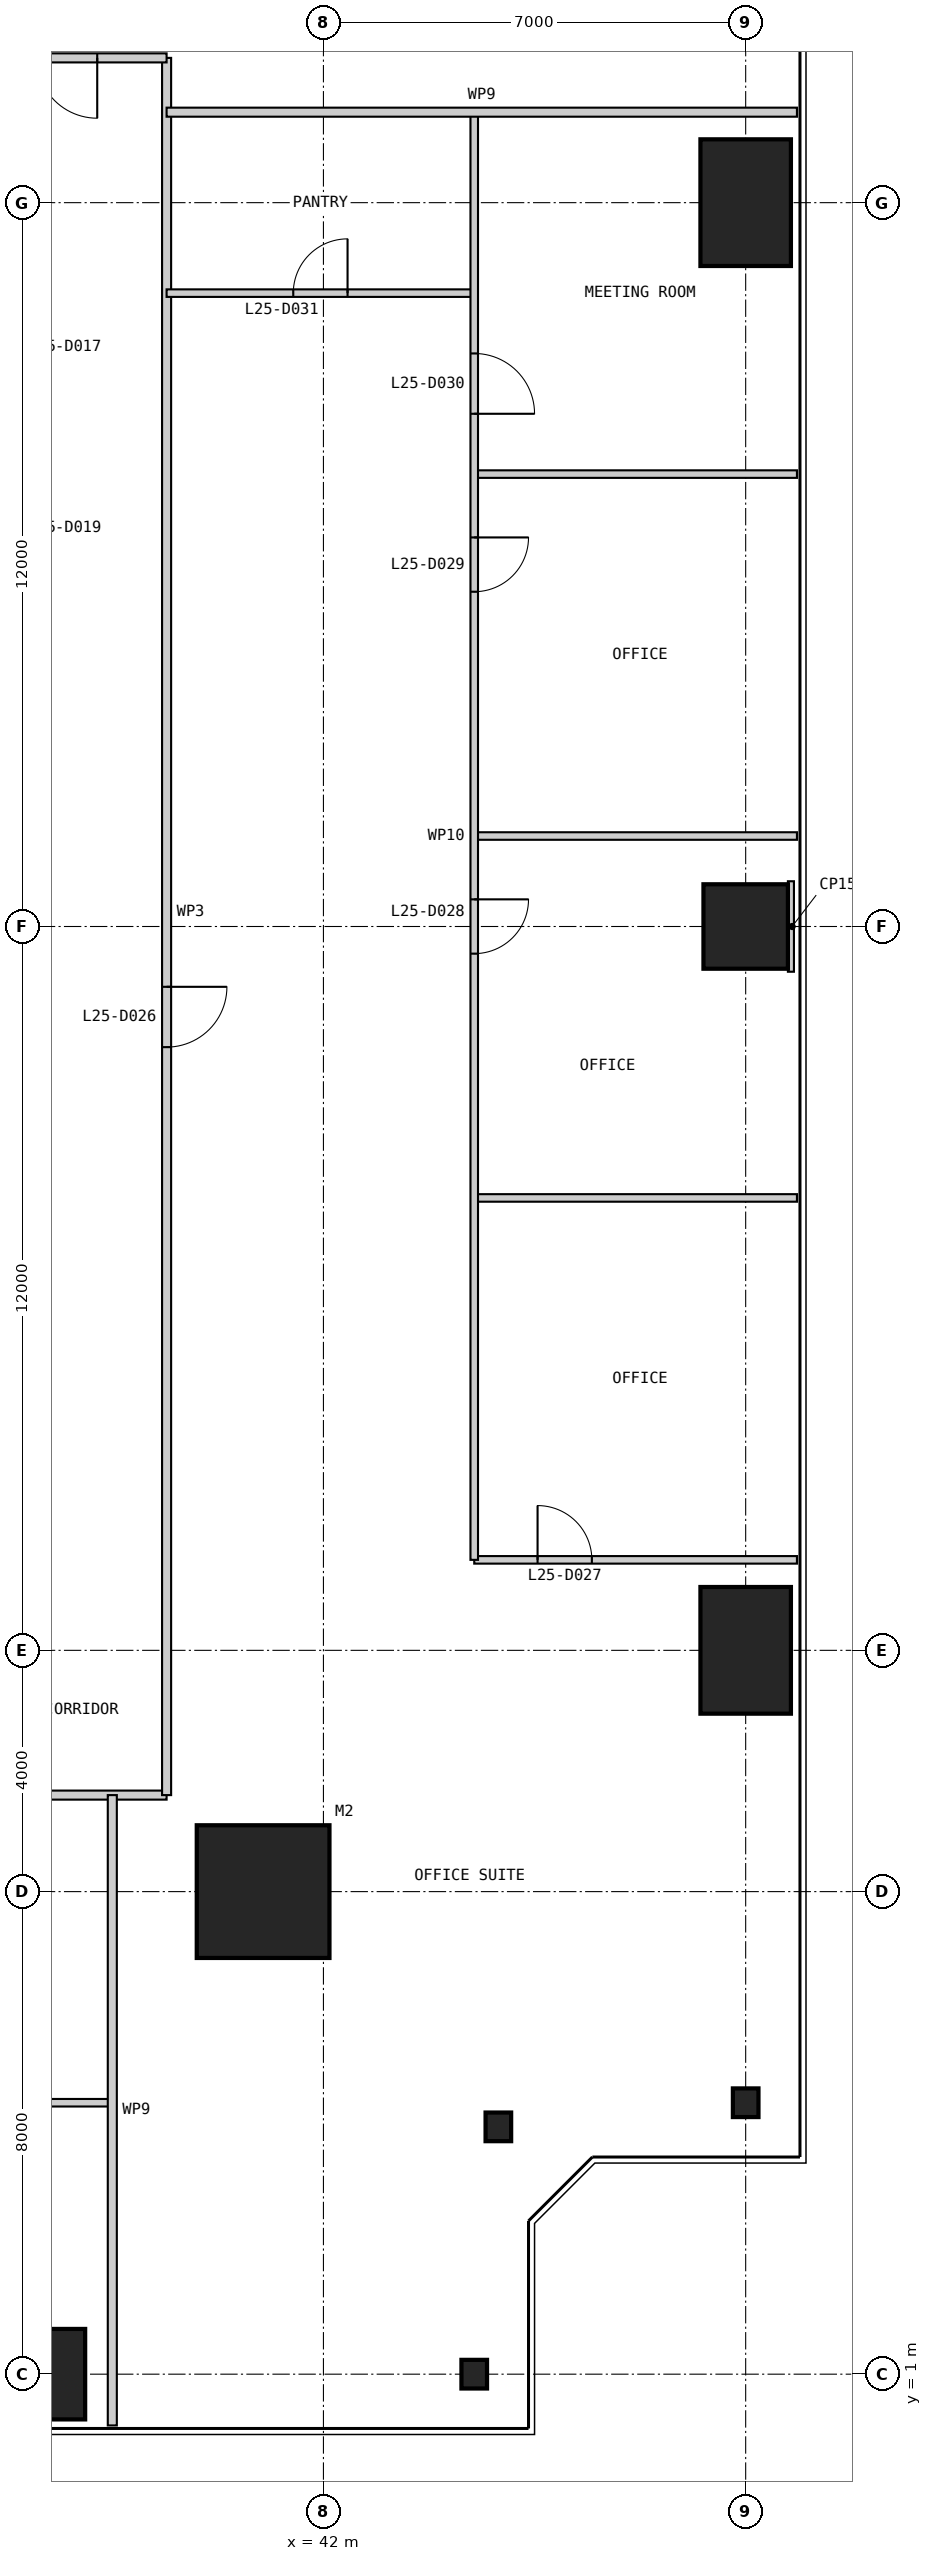
"""IFC4 building model, lengths in metres.
Left out: names, types, materials, properties, quantities, classifications, styles, units other than length and angle.
Written with IfcOpenShell. Run it as: python <this file> out.ifc"""

import sys

from ifc_helpers import new_model, si_unit, direction, frame, frame_2d, origin, origin_2d, place, context, subcontext, project, spatial, rectangle, i_section, extrude, element, fill, save


model = new_model("IFC4")
c1 = context("Model", 3, precision=1e-05, world=origin(), true_north=direction((0.0, 1.0)))
c2 = subcontext(c1, "Body", "Model", "MODEL_VIEW")
j1 = project(units=[si_unit("LENGTHUNIT", "METRE"), si_unit("PLANEANGLEUNIT", "RADIAN")], contexts=[c1])
p1 = place(None, origin())
s1 = spatial("IfcSite", under=j1, at=p1, CompositionType="ELEMENT")
p2 = place(p1, origin())
s2 = spatial("IfcBuilding", under=s1, at=p2, CompositionType="ELEMENT")
p3 = place(p2, frame((0.0, 0.0, 110.4)))
s3 = spatial("IfcBuildingStorey", under=s2, at=p3, CompositionType="ELEMENT", Elevation=110.4)
p4 = place(p3, frame((41.0, 9.0, 0.0), z_axis=(0.0, 0.0, 1.0), x_axis=(1.0, 0.0, 0.0)))
e1 = element("IfcColumn", 1, at=p4, inside=s3, PredefinedType="COLUMN", context=c2, shape_type="SweptSolid", body=[
    extrude(rectangle(XDim=2.2, YDim=2.2, at=origin_2d()), origin(), (0.0, 0.0, 1.0), 4.0),
])
p5 = place(p3, frame((37.0, 1.0, 0.0), z_axis=(0.0, 0.0, 1.0), x_axis=(1.0, 0.0, 0.0)))
e2 = element("IfcColumn", 2, at=p5, inside=s3, PredefinedType="COLUMN", context=c2, shape_type="SweptSolid", body=[
    extrude(rectangle(XDim=2.1, YDim=1.5, at=origin_2d()), origin(), (0.0, 0.0, 1.0), 4.0),
])
for number, where, z_axis, x_axis in (
    (3, (44.5, 1.0, 0.0), (0.0, 0.0, 1.0), (1.0, 0.0, 0.0)),
    (4, (44.9, 5.1, 0.0), (0.0, 0.0, 1.0), (1.0, 0.0, 0.0)),
    (5, (49.0, 5.5, 0.0), (0.0, 0.0, 1.0), (1.0, 0.0, 0.0)),
):
    element("IfcColumn", number, at=place(p3, frame(where, z_axis=z_axis, x_axis=x_axis)), inside=s3, PredefinedType="COLUMN", context=c2, shape_type="SweptSolid", body=[
        extrude(i_section(OverallWidth=0.424, OverallDepth=0.475, WebThickness=0.048, FlangeThickness=0.077, at=origin_2d()), origin(), (0.0, 0.0, 1.0), 4.0),
    ])
p6 = place(p3, frame((49.0, 13.0, 0.0), z_axis=(0.0, 0.0, 1.0), x_axis=(1.0, 0.0, 0.0)))
e6 = element("IfcColumn", 6, at=p6, inside=s3, PredefinedType="COLUMN", context=c2, shape_type="SweptSolid", body=[
    extrude(rectangle(XDim=1.5, YDim=2.1, at=origin_2d()), origin(), (0.0, 0.0, 1.0), 4.0),
])
p7 = place(p3, frame((49.0, 25.0, 0.0), z_axis=(0.0, 0.0, 1.0), x_axis=(1.0, 0.0, 0.0)))
e7 = element("IfcColumn", 7, at=p7, inside=s3, PredefinedType="COLUMN", context=c2, shape_type="SweptSolid", body=[
    extrude(rectangle(XDim=1.4, YDim=1.4, at=origin_2d()), origin(), (0.0, 0.0, 1.0), 4.0),
])
p8 = place(p3, frame((49.0, 37.0, 0.0), z_axis=(0.0, 0.0, 1.0), x_axis=(1.0, 0.0, 0.0)))
e8 = element("IfcColumn", 8, at=p8, inside=s3, PredefinedType="COLUMN", context=c2, shape_type="SweptSolid", body=[
    extrude(rectangle(XDim=1.5, YDim=2.1, at=origin_2d()), origin(), (0.0, 0.0, 1.0), 4.0),
])
p9 = place(p3, frame((11.5, 10.6, 0.0), z_axis=(0.0, 0.0, 1.0), x_axis=(1.0, 0.0, 0.0)))
e9 = element("IfcWall", 9, at=p9, inside=s3, PredefinedType="PARTITIONING", context=c2, shape_type="SweptSolid", body=[
    extrude(rectangle(XDim=27.9, YDim=0.15, at=frame_2d((13.95, 0.0))), origin(), (0.0, 0.0, 1.0), 3.85),
])
p10 = place(p9, frame((12.25, 0.0, 0.0)))
e10 = element("IfcOpeningElement", 10, at=p10, cuts=e9, PredefinedType="OPENING", context=c2, shape_type="SweptSolid", body=[
    extrude(rectangle(XDim=1.0, YDim=2.2, at=frame_2d((0.5, 1.1))), frame((0.0, 0.085, 0.0), z_axis=(0.0, -1.0, 0.0), x_axis=(1.0, 0.0, 0.0)), (0.0, 0.0, 1.0), 0.17),
])
p11 = place(p3, frame((14.5, 5.5, 0.0), z_axis=(0.0, 0.0, 1.0), x_axis=(1.0, 0.0, 0.0)))
e11 = element("IfcWall", 11, at=p11, inside=s3, PredefinedType="PARTITIONING", context=c2, shape_type="SweptSolid", body=[
    extrude(rectangle(XDim=24.0, YDim=0.125, at=frame_2d((12.0, 0.0))), origin(), (0.0, 0.0, 1.0), 3.85),
])
p12 = place(p11, frame((10.05, 0.0, 0.0)))
e12 = element("IfcOpeningElement", 12, at=p12, cuts=e11, PredefinedType="OPENING", context=c2, shape_type="SweptSolid", body=[
    extrude(rectangle(XDim=0.9, YDim=2.2, at=frame_2d((0.45, 1.1))), frame((0.0, 0.073, 0.0), z_axis=(0.0, -1.0, 0.0), x_axis=(1.0, 0.0, 0.0)), (0.0, 0.0, 1.0), 0.145),
])
p13 = place(p11, frame((16.05, 0.0, 0.0)))
e13 = element("IfcOpeningElement", 13, at=p13, cuts=e11, PredefinedType="OPENING", context=c2, shape_type="SweptSolid", body=[
    extrude(rectangle(XDim=0.9, YDim=2.2, at=frame_2d((0.45, 1.1))), frame((0.0, 0.073, 0.0), z_axis=(0.0, -1.0, 0.0), x_axis=(1.0, 0.0, 0.0)), (0.0, 0.0, 1.0), 0.145),
])
p14 = place(p11, frame((19.0, 0.0, 0.0)))
e14 = element("IfcOpeningElement", 14, at=p14, cuts=e11, PredefinedType="OPENING", context=c2, shape_type="SweptSolid", body=[
    extrude(rectangle(XDim=1.0, YDim=2.2, at=frame_2d((0.5, 1.1))), frame((0.0, 0.073, 0.0), z_axis=(0.0, -1.0, 0.0), x_axis=(1.0, 0.0, 0.0)), (0.0, 0.0, 1.0), 0.145),
])
p15 = place(p3, frame((39.4, 10.6, 0.0), z_axis=(0.0, 0.0, 1.0), x_axis=(0.0, 1.0, 0.0)))
e15 = element("IfcWall", 15, at=p15, inside=s3, PredefinedType="PARTITIONING", context=c2, shape_type="SweptSolid", body=[
    extrude(rectangle(XDim=28.8, YDim=0.15, at=frame_2d((14.4, 0.0))), origin(), (0.0, 0.0, 1.0), 3.85),
])
p16 = place(p15, frame((12.4, 0.0, 0.0)))
e16 = element("IfcOpeningElement", 16, at=p16, cuts=e15, PredefinedType="OPENING", context=c2, shape_type="SweptSolid", body=[
    extrude(rectangle(XDim=1.0, YDim=2.2, at=frame_2d((0.5, 1.1))), frame((0.0, 0.085, 0.0), z_axis=(0.0, -1.0, 0.0), x_axis=(1.0, 0.0, 0.0)), (0.0, 0.0, 1.0), 0.17),
])
p17 = place(p3, frame((38.5, 0.15, 0.0), z_axis=(0.0, 0.0, 1.0), x_axis=(0.0, 1.0, 0.0)))
e17 = element("IfcWall", 17, at=p17, inside=s3, PredefinedType="PARTITIONING", context=c2, shape_type="SweptSolid", body=[
    extrude(rectangle(XDim=10.45, YDim=0.15, at=frame_2d((5.225, 0.0))), origin(), (0.0, 0.0, 1.0), 3.85),
])
p18 = place(p3, frame((49.85, 14.5, 0.0), z_axis=(0.0, 0.0, 1.0), x_axis=(-1.0, 0.0, 0.0)))
e18 = element("IfcWall", 18, at=p18, inside=s3, PredefinedType="PARTITIONING", context=c2, shape_type="SweptSolid", body=[
    extrude(rectangle(XDim=5.35, YDim=0.125, at=frame_2d((2.675, 0.0))), origin(), (0.0, 0.0, 1.0), 3.85),
])
p19 = place(p18, frame((3.4, 0.0, 0.0)))
e19 = element("IfcOpeningElement", 19, at=p19, cuts=e18, PredefinedType="OPENING", context=c2, shape_type="SweptSolid", body=[
    extrude(rectangle(XDim=0.9, YDim=2.2, at=frame_2d((0.45, 1.1))), frame((0.0, 0.073, 0.0), z_axis=(0.0, -1.0, 0.0), x_axis=(1.0, 0.0, 0.0)), (0.0, 0.0, 1.0), 0.145),
])
for number, where, z_axis, x_axis in (
    (20, (49.85, 20.5, 0.0), (0.0, 0.0, 1.0), (-1.0, 0.0, 0.0)),
    (21, (49.85, 26.5, 0.0), (0.0, 0.0, 1.0), (-1.0, 0.0, 0.0)),
    (22, (49.85, 32.5, 0.0), (0.0, 0.0, 1.0), (-1.0, 0.0, 0.0)),
):
    element("IfcWall", number, at=place(p3, frame(where, z_axis=z_axis, x_axis=x_axis)), inside=s3, PredefinedType="PARTITIONING", context=c2, shape_type="SweptSolid", body=[
        extrude(rectangle(XDim=5.35, YDim=0.125, at=frame_2d((2.675, 0.0))), origin(), (0.0, 0.0, 1.0), 3.85),
    ])
p20 = place(p3, frame((44.5, 35.5, 0.0), z_axis=(0.0, 0.0, 1.0), x_axis=(-1.0, 0.0, 0.0)))
e23 = element("IfcWall", 23, at=p20, inside=s3, PredefinedType="PARTITIONING", context=c2, shape_type="SweptSolid", body=[
    extrude(rectangle(XDim=5.1, YDim=0.125, at=frame_2d((2.55, 0.0))), origin(), (0.0, 0.0, 1.0), 3.85),
])
p21 = place(p20, frame((2.1, 0.0, 0.0)))
e24 = element("IfcOpeningElement", 24, at=p21, cuts=e23, PredefinedType="OPENING", context=c2, shape_type="SweptSolid", body=[
    extrude(rectangle(XDim=0.9, YDim=2.2, at=frame_2d((0.45, 1.1))), frame((0.0, 0.073, 0.0), z_axis=(0.0, -1.0, 0.0), x_axis=(1.0, 0.0, 0.0)), (0.0, 0.0, 1.0), 0.145),
])
p22 = place(p3, frame((44.5, 14.5, 0.0), z_axis=(0.0, 0.0, 1.0), x_axis=(0.0, 1.0, 0.0)))
e25 = element("IfcWall", 25, at=p22, inside=s3, PredefinedType="PARTITIONING", context=c2, shape_type="SweptSolid", body=[
    extrude(rectangle(XDim=24.0, YDim=0.125, at=frame_2d((12.0, 0.0))), origin(), (0.0, 0.0, 1.0), 3.85),
])
p23 = place(p22, frame((10.05, 0.0, 0.0)))
e26 = element("IfcOpeningElement", 26, at=p23, cuts=e25, PredefinedType="OPENING", context=c2, shape_type="SweptSolid", body=[
    extrude(rectangle(XDim=0.9, YDim=2.2, at=frame_2d((0.45, 1.1))), frame((0.0, 0.073, 0.0), z_axis=(0.0, -1.0, 0.0), x_axis=(1.0, 0.0, 0.0)), (0.0, 0.0, 1.0), 0.145),
])
p24 = place(p22, frame((16.05, 0.0, 0.0)))
e27 = element("IfcOpeningElement", 27, at=p24, cuts=e25, PredefinedType="OPENING", context=c2, shape_type="SweptSolid", body=[
    extrude(rectangle(XDim=0.9, YDim=2.2, at=frame_2d((0.45, 1.1))), frame((0.0, 0.073, 0.0), z_axis=(0.0, -1.0, 0.0), x_axis=(1.0, 0.0, 0.0)), (0.0, 0.0, 1.0), 0.145),
])
p25 = place(p22, frame((19.0, 0.0, 0.0)))
e28 = element("IfcOpeningElement", 28, at=p25, cuts=e25, PredefinedType="OPENING", context=c2, shape_type="SweptSolid", body=[
    extrude(rectangle(XDim=1.0, YDim=2.2, at=frame_2d((0.5, 1.1))), frame((0.0, 0.073, 0.0), z_axis=(0.0, -1.0, 0.0), x_axis=(1.0, 0.0, 0.0)), (0.0, 0.0, 1.0), 0.145),
])
p26 = place(p3, frame((39.4, 39.4, 0.0), z_axis=(0.0, 0.0, 1.0), x_axis=(-1.0, 0.0, 0.0)))
e29 = element("IfcWall", 29, at=p26, inside=s3, PredefinedType="PARTITIONING", context=c2, shape_type="SweptSolid", body=[
    extrude(rectangle(XDim=27.9, YDim=0.15, at=frame_2d((13.95, 0.0))), origin(), (0.0, 0.0, 1.0), 3.85),
])
p27 = place(p26, frame((4.15, 0.0, 0.0)))
e30 = element("IfcOpeningElement", 30, at=p27, cuts=e29, PredefinedType="OPENING", context=c2, shape_type="SweptSolid", body=[
    extrude(rectangle(XDim=1.0, YDim=2.2, at=frame_2d((0.5, 1.1))), frame((0.0, 0.085, 0.0), z_axis=(0.0, -1.0, 0.0), x_axis=(1.0, 0.0, 0.0)), (0.0, 0.0, 1.0), 0.17),
])
p28 = place(p26, frame((25.15, 0.0, 0.0)))
e31 = element("IfcOpeningElement", 31, at=p28, cuts=e29, PredefinedType="OPENING", context=c2, shape_type="SweptSolid", body=[
    extrude(rectangle(XDim=1.0, YDim=2.2, at=frame_2d((0.5, 1.1))), frame((0.0, 0.085, 0.0), z_axis=(0.0, -1.0, 0.0), x_axis=(1.0, 0.0, 0.0)), (0.0, 0.0, 1.0), 0.17),
])
p29 = place(p26, frame((1.15, 0.0, 0.0)))
e32 = element("IfcOpeningElement", 32, at=p29, cuts=e29, PredefinedType="OPENING", context=c2, shape_type="SweptSolid", body=[
    extrude(rectangle(XDim=1.0, YDim=2.2, at=frame_2d((0.5, 1.1))), frame((0.0, 0.085, 0.0), z_axis=(0.0, -1.0, 0.0), x_axis=(1.0, 0.0, 0.0)), (0.0, 0.0, 1.0), 0.17),
])
p30 = place(p3, frame((49.85, 38.5, 0.0), z_axis=(0.0, 0.0, 1.0), x_axis=(-1.0, 0.0, 0.0)))
e33 = element("IfcWall", 33, at=p30, inside=s3, PredefinedType="PARTITIONING", context=c2, shape_type="SweptSolid", body=[
    extrude(rectangle(XDim=10.45, YDim=0.15, at=frame_2d((5.225, 0.0))), origin(), (0.0, 0.0, 1.0), 3.85),
])
p31 = place(p3, frame((49.8, 25.0, 0.0), z_axis=(0.0, 0.0, 1.0), x_axis=(-1.0, 0.0, 0.0)))
e34 = element("IfcWall", 34, at=p31, inside=s3, PredefinedType="PARTITIONING", context=c2, shape_type="SweptSolid", body=[
    extrude(rectangle(XDim=0.1, YDim=1.5, at=frame_2d((0.05, 0.0))), origin(), (0.0, 0.0, 1.0), 3.85),
])
p32 = place(p16, frame((1.0, 0.0, 0.0), z_axis=(0.0, 0.0, 1.0), x_axis=(-1.0, 0.0, 0.0)))
e35 = element("IfcDoor", 35, at=p32, inside=s3, OperationType="SINGLE_SWING_LEFT", PredefinedType="DOOR", context=c2, shape_type="SweptSolid", body=[
    extrude(rectangle(XDim=1.0, YDim=2.2, at=frame_2d((0.5, 1.1))), frame((0.0, 0.025, 0.0), z_axis=(0.0, -1.0, 0.0), x_axis=(1.0, 0.0, 0.0)), (0.0, 0.0, 1.0), 0.05),
])
fill(e16, e35)
p33 = place(p19, frame((0.9, 0.0, 0.0), z_axis=(0.0, 0.0, 1.0), x_axis=(-1.0, 0.0, 0.0)))
e36 = element("IfcDoor", 36, at=p33, inside=s3, OperationType="SINGLE_SWING_LEFT", PredefinedType="DOOR", context=c2, shape_type="SweptSolid", body=[
    extrude(rectangle(XDim=0.9, YDim=2.2, at=frame_2d((0.45, 1.1))), frame((0.0, 0.025, 0.0), z_axis=(0.0, -1.0, 0.0), x_axis=(1.0, 0.0, 0.0)), (0.0, 0.0, 1.0), 0.05),
])
fill(e19, e36)
p34 = place(p23, frame((0.9, 0.0, 0.0), z_axis=(0.0, 0.0, 1.0), x_axis=(-1.0, 0.0, 0.0)))
e37 = element("IfcDoor", 37, at=p34, inside=s3, OperationType="SINGLE_SWING_LEFT", PredefinedType="DOOR", context=c2, shape_type="SweptSolid", body=[
    extrude(rectangle(XDim=0.9, YDim=2.2, at=frame_2d((0.45, 1.1))), frame((0.0, 0.025, 0.0), z_axis=(0.0, -1.0, 0.0), x_axis=(1.0, 0.0, 0.0)), (0.0, 0.0, 1.0), 0.05),
])
fill(e26, e37)
p35 = place(p24, frame((0.9, 0.0, 0.0), z_axis=(0.0, 0.0, 1.0), x_axis=(-1.0, 0.0, 0.0)))
e38 = element("IfcDoor", 38, at=p35, inside=s3, OperationType="SINGLE_SWING_LEFT", PredefinedType="DOOR", context=c2, shape_type="SweptSolid", body=[
    extrude(rectangle(XDim=0.9, YDim=2.2, at=frame_2d((0.45, 1.1))), frame((0.0, 0.025, 0.0), z_axis=(0.0, -1.0, 0.0), x_axis=(1.0, 0.0, 0.0)), (0.0, 0.0, 1.0), 0.05),
])
fill(e27, e38)
p36 = place(p25, frame((1.0, 0.0, 0.0), z_axis=(0.0, 0.0, 1.0), x_axis=(-1.0, 0.0, 0.0)))
e39 = element("IfcDoor", 39, at=p36, inside=s3, OperationType="SINGLE_SWING_RIGHT", PredefinedType="DOOR", context=c2, shape_type="SweptSolid", body=[
    extrude(rectangle(XDim=1.0, YDim=2.2, at=frame_2d((0.5, 1.1))), frame((0.0, 0.025, 0.0), z_axis=(0.0, -1.0, 0.0), x_axis=(1.0, 0.0, 0.0)), (0.0, 0.0, 1.0), 0.05),
])
fill(e28, e39)
p37 = place(p21, frame((0.9, 0.0, 0.0), z_axis=(0.0, 0.0, 1.0), x_axis=(-1.0, 0.0, 0.0)))
e40 = element("IfcDoor", 40, at=p37, inside=s3, OperationType="SINGLE_SWING_RIGHT", PredefinedType="DOOR", context=c2, shape_type="SweptSolid", body=[
    extrude(rectangle(XDim=0.9, YDim=2.2, at=frame_2d((0.45, 1.1))), frame((0.0, 0.025, 0.0), z_axis=(0.0, -1.0, 0.0), x_axis=(1.0, 0.0, 0.0)), (0.0, 0.0, 1.0), 0.05),
])
fill(e24, e40)
p38 = place(p29, origin())
e41 = element("IfcDoor", 41, at=p38, inside=s3, OperationType="SINGLE_SWING_LEFT", PredefinedType="DOOR", context=c2, shape_type="SweptSolid", body=[
    extrude(rectangle(XDim=1.0, YDim=2.2, at=frame_2d((0.5, 1.1))), frame((0.0, 0.025, 0.0), z_axis=(0.0, -1.0, 0.0), x_axis=(1.0, 0.0, 0.0)), (0.0, 0.0, 1.0), 0.05),
])
fill(e32, e41)
save(model, sys.argv[1])
